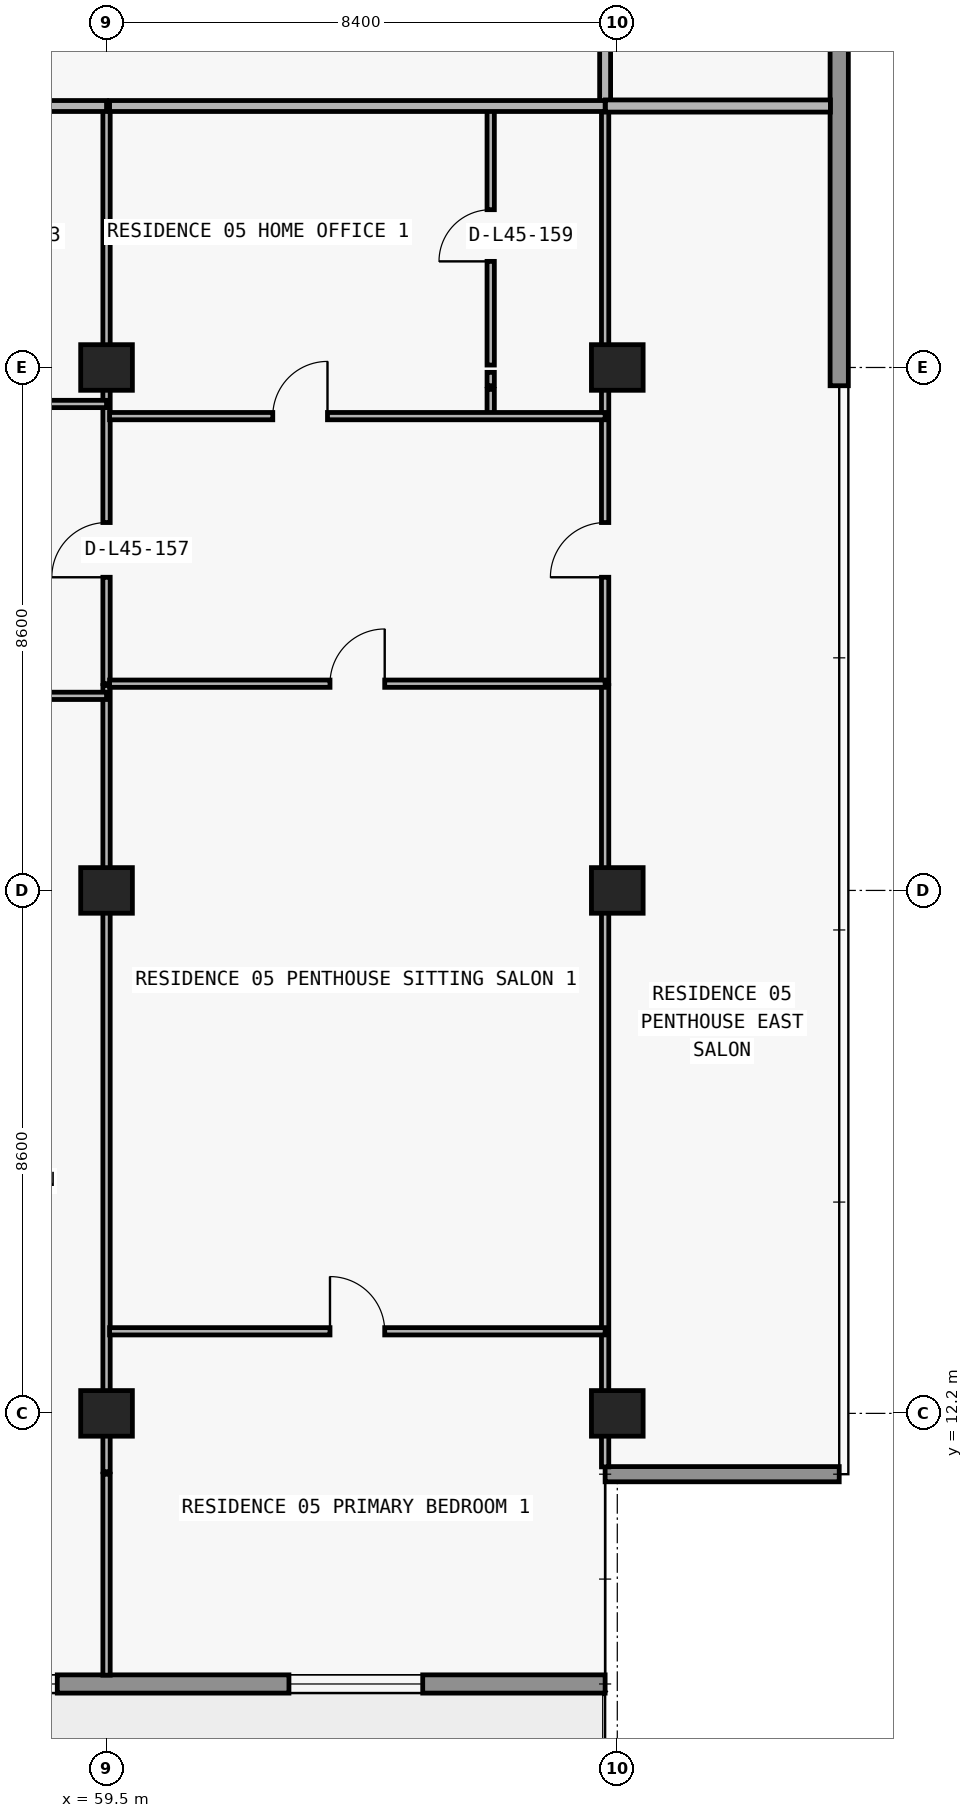
"""IFC4 building model, lengths in metres.
Left out: names, types, materials, properties, quantities, classifications, styles, units other than length and angle.
Written with IfcOpenShell. Run it as: python <this file> out.ifc"""

import sys

from ifc_helpers import new_model, si_unit, direction, frame, frame_2d, origin, origin_2d, place, context, subcontext, project, spatial, rectangle, extrude, element, fill, save


model = new_model("IFC4")
c1 = context("Model", 3, precision=1e-05, world=origin(), true_north=direction((0.0, 1.0)))
c2 = subcontext(c1, "Body", "Model", "MODEL_VIEW")
j1 = project(units=[si_unit("LENGTHUNIT", "METRE"), si_unit("PLANEANGLEUNIT", "RADIAN")], contexts=[c1])
p1 = place(None, origin())
s1 = spatial("IfcSite", under=j1, at=p1, CompositionType="ELEMENT")
p2 = place(p1, origin())
s2 = spatial("IfcBuilding", under=s1, at=p2, CompositionType="ELEMENT")
p3 = place(p2, frame((0.0, 0.0, 163.8)))
s3 = spatial("IfcBuildingStorey", under=s2, at=p3, CompositionType="ELEMENT", Elevation=163.8)
for number, where, z_axis, x_axis in (
    (1, (59.5, 12.2, 0.0), (0.0, 0.0, 1.0), (1.0, 0.0, 0.0)),
    (2, (67.9, 12.2, 0.0), (0.0, 0.0, 1.0), (1.0, 0.0, 0.0)),
    (3, (59.5, 20.8, 0.0), (0.0, 0.0, 1.0), (1.0, 0.0, 0.0)),
    (4, (67.9, 20.8, 0.0), (0.0, 0.0, 1.0), (1.0, 0.0, 0.0)),
    (5, (59.5, 29.4, 0.0), (0.0, 0.0, 1.0), (1.0, 0.0, 0.0)),
    (6, (67.9, 29.4, 0.0), (0.0, 0.0, 1.0), (1.0, 0.0, 0.0)),
):
    element("IfcColumn", number, at=place(p3, frame(where, z_axis=z_axis, x_axis=x_axis)), inside=s3, PredefinedType="COLUMN", context=c2, shape_type="SweptSolid", body=[
        extrude(rectangle(XDim=0.85, YDim=0.75, at=origin_2d()), origin(), (0.0, 0.0, 1.0), 3.05),
    ])
p4 = place(p3, frame((67.7, 7.75, 0.0), z_axis=(0.0, 0.0, 1.0), x_axis=(-1.0, 0.0, 0.0)))
e7 = element("IfcWall", 7, at=p4, inside=s3, PredefinedType="STANDARD", context=c2, shape_type="SweptSolid", body=[
    extrude(rectangle(XDim=57.6, YDim=0.3, at=frame_2d((28.8, 0.0))), origin(), (0.0, 0.0, 1.0), 3.05),
])
p5 = place(p4, frame((54.69, 0.0, 0.0)))
e8 = element("IfcOpeningElement", 8, at=p5, cuts=e7, PredefinedType="OPENING", context=c2, shape_type="SweptSolid", body=[
    extrude(rectangle(XDim=2.0, YDim=2.3, at=frame_2d((1.0, 1.15))), frame((0.0, 0.16, 0.0), z_axis=(0.0, -1.0, 0.0), x_axis=(1.0, 0.0, 0.0)), (0.0, 0.0, 1.0), 0.32),
])
p6 = place(p4, frame((50.21, 0.0, 0.65)))
e9 = element("IfcOpeningElement", 9, at=p6, cuts=e7, PredefinedType="OPENING", context=c2, shape_type="SweptSolid", body=[
    extrude(rectangle(XDim=2.6, YDim=1.85, at=frame_2d((1.3, 0.925))), frame((0.0, 0.16, 0.0), z_axis=(0.0, -1.0, 0.0), x_axis=(1.0, 0.0, 0.0)), (0.0, 0.0, 1.0), 0.32),
])
p7 = place(p4, frame((44.1, 0.0, 0.85)))
e10 = element("IfcOpeningElement", 10, at=p7, cuts=e7, PredefinedType="OPENING", context=c2, shape_type="SweptSolid", body=[
    extrude(rectangle(XDim=2.2, YDim=1.55, at=frame_2d((1.1, 0.775))), frame((0.0, 0.16, 0.0), z_axis=(0.0, -1.0, 0.0), x_axis=(1.0, 0.0, 0.0)), (0.0, 0.0, 1.0), 0.32),
])
p8 = place(p4, frame((37.69, 0.0, 0.0)))
e11 = element("IfcOpeningElement", 11, at=p8, cuts=e7, PredefinedType="OPENING", context=c2, shape_type="SweptSolid", body=[
    extrude(rectangle(XDim=2.0, YDim=2.3, at=frame_2d((1.0, 1.15))), frame((0.0, 0.16, 0.0), z_axis=(0.0, -1.0, 0.0), x_axis=(1.0, 0.0, 0.0)), (0.0, 0.0, 1.0), 0.32),
])
p9 = place(p4, frame((33.59, 0.0, 0.85)))
e12 = element("IfcOpeningElement", 12, at=p9, cuts=e7, PredefinedType="OPENING", context=c2, shape_type="SweptSolid", body=[
    extrude(rectangle(XDim=1.8, YDim=1.55, at=frame_2d((0.9, 0.775))), frame((0.0, 0.16, 0.0), z_axis=(0.0, -1.0, 0.0), x_axis=(1.0, 0.0, 0.0)), (0.0, 0.0, 1.0), 0.32),
])
p10 = place(p4, frame((25.914, 0.0, 0.85)))
e13 = element("IfcOpeningElement", 13, at=p10, cuts=e7, PredefinedType="OPENING", context=c2, shape_type="SweptSolid", body=[
    extrude(rectangle(XDim=2.2, YDim=1.55, at=frame_2d((1.1, 0.775))), frame((0.0, 0.16, 0.0), z_axis=(0.0, -1.0, 0.0), x_axis=(1.0, 0.0, 0.0)), (0.0, 0.0, 1.0), 0.32),
])
p11 = place(p4, frame((21.69, 0.0, 0.0)))
e14 = element("IfcOpeningElement", 14, at=p11, cuts=e7, PredefinedType="OPENING", context=c2, shape_type="SweptSolid", body=[
    extrude(rectangle(XDim=2.0, YDim=2.3, at=frame_2d((1.0, 1.15))), frame((0.0, 0.16, 0.0), z_axis=(0.0, -1.0, 0.0), x_axis=(1.0, 0.0, 0.0)), (0.0, 0.0, 1.0), 0.32),
])
p12 = place(p4, frame((17.59, 0.0, 0.85)))
e15 = element("IfcOpeningElement", 15, at=p12, cuts=e7, PredefinedType="OPENING", context=c2, shape_type="SweptSolid", body=[
    extrude(rectangle(XDim=1.8, YDim=1.55, at=frame_2d((0.9, 0.775))), frame((0.0, 0.16, 0.0), z_axis=(0.0, -1.0, 0.0), x_axis=(1.0, 0.0, 0.0)), (0.0, 0.0, 1.0), 0.32),
])
p13 = place(p4, frame((13.69, 0.0, 0.0)))
e16 = element("IfcOpeningElement", 16, at=p13, cuts=e7, PredefinedType="OPENING", context=c2, shape_type="SweptSolid", body=[
    extrude(rectangle(XDim=2.0, YDim=2.3, at=frame_2d((1.0, 1.15))), frame((0.0, 0.16, 0.0), z_axis=(0.0, -1.0, 0.0), x_axis=(1.0, 0.0, 0.0)), (0.0, 0.0, 1.0), 0.32),
])
p14 = place(p4, frame((9.01, 0.0, 0.65)))
e17 = element("IfcOpeningElement", 17, at=p14, cuts=e7, PredefinedType="OPENING", context=c2, shape_type="SweptSolid", body=[
    extrude(rectangle(XDim=2.6, YDim=1.85, at=frame_2d((1.3, 0.925))), frame((0.0, 0.16, 0.0), z_axis=(0.0, -1.0, 0.0), x_axis=(1.0, 0.0, 0.0)), (0.0, 0.0, 1.0), 0.32),
])
p15 = place(p4, frame((3.0, 0.0, 0.85)))
e18 = element("IfcOpeningElement", 18, at=p15, cuts=e7, PredefinedType="OPENING", context=c2, shape_type="SweptSolid", body=[
    extrude(rectangle(XDim=2.2, YDim=1.55, at=frame_2d((1.1, 0.775))), frame((0.0, 0.16, 0.0), z_axis=(0.0, -1.0, 0.0), x_axis=(1.0, 0.0, 0.0)), (0.0, 0.0, 1.0), 0.32),
])
p16 = place(p3, frame((67.7, 11.2, 0.0), z_axis=(0.0, 0.0, 1.0), x_axis=(1.0, 0.0, 0.0)))
e19 = element("IfcWall", 19, at=p16, inside=s3, PredefinedType="ELEMENTEDWALL", context=c2, shape_type="SweptSolid", body=[
    extrude(rectangle(XDim=3.85, YDim=0.25, at=frame_2d((1.925, 0.0))), origin(), (0.0, 0.0, 1.0), 3.05),
])
p17 = place(p3, frame((71.55, 47.0, 0.0), z_axis=(0.0, 0.0, 1.0), x_axis=(0.0, -1.0, 0.0)))
e20 = element("IfcWall", 20, at=p17, inside=s3, PredefinedType="STANDARD", context=c2, shape_type="SweptSolid", body=[
    extrude(rectangle(XDim=17.9, YDim=0.3, at=frame_2d((8.95, 0.0))), origin(), (0.0, 0.0, 1.0), 3.05),
])
p18 = place(p3, frame((59.5, 7.895, 0.0), z_axis=(0.0, 0.0, 1.0), x_axis=(0.0, 1.0, 0.0)))
e21 = element("IfcWall", 21, at=p18, inside=s3, PredefinedType="PARTITIONING", context=c2, shape_type="SweptSolid", body=[
    extrude(rectangle(XDim=3.305, YDim=0.12, at=frame_2d((1.652, 0.0))), origin(), (0.0, 0.0, 1.0), 3.05),
])
p19 = place(p3, frame((59.5, 11.24, 0.0), z_axis=(0.0, 0.0, 1.0), x_axis=(0.0, 1.0, 0.0)))
e22 = element("IfcWall", 22, at=p19, inside=s3, PredefinedType="PARTITIONING", context=c2, shape_type="SweptSolid", body=[
    extrude(rectangle(XDim=12.93, YDim=0.12, at=frame_2d((6.465, 0.0))), origin(), (0.0, 0.0, 1.0), 2.263),
])
p20 = place(p3, frame((59.5, 24.2, 0.0), z_axis=(0.0, 0.0, 1.0), x_axis=(0.0, 1.0, 0.0)))
e23 = element("IfcWall", 23, at=p20, inside=s3, PredefinedType="PARTITIONING", context=c2, shape_type="SweptSolid", body=[
    extrude(rectangle(XDim=4.84, YDim=0.12, at=frame_2d((2.42, 0.0))), origin(), (0.0, 0.0, 1.0), 2.263),
])
p21 = place(p20, frame((1.75, 0.0, 0.0)))
e24 = element("IfcOpeningElement", 24, at=p21, cuts=e23, PredefinedType="OPENING", context=c2, shape_type="SweptSolid", body=[
    extrude(rectangle(XDim=0.9, YDim=2.15, at=frame_2d((0.45, 1.075))), frame((0.0, 0.07, 0.0), z_axis=(0.0, -1.0, 0.0), x_axis=(1.0, 0.0, 0.0)), (0.0, 0.0, 1.0), 0.14),
])
p22 = place(p3, frame((59.5, 29.1, 0.0), z_axis=(0.0, 0.0, 1.0), x_axis=(0.0, 1.0, 0.0)))
e25 = element("IfcWall", 25, at=p22, inside=s3, PredefinedType="PARTITIONING", context=c2, shape_type="SweptSolid", body=[
    extrude(rectangle(XDim=0.22, YDim=0.12, at=frame_2d((0.11, 0.0))), origin(), (0.0, 0.0, 1.0), 3.05),
])
p23 = place(p3, frame((59.5, 29.44, 0.0), z_axis=(0.0, 0.0, 1.0), x_axis=(0.0, 1.0, 0.0)))
e26 = element("IfcWall", 26, at=p23, inside=s3, PredefinedType="PARTITIONING", context=c2, shape_type="SweptSolid", body=[
    extrude(rectangle(XDim=4.26, YDim=0.12, at=frame_2d((2.13, 0.0))), origin(), (0.0, 0.0, 1.0), 2.263),
])
p24 = place(p3, frame((65.818, 28.6, 0.0), z_axis=(0.0, 0.0, 1.0), x_axis=(0.0, 1.0, 0.0)))
e27 = element("IfcWall", 27, at=p24, inside=s3, PredefinedType="PARTITIONING", context=c2, shape_type="SweptSolid", body=[
    extrude(rectangle(XDim=0.44, YDim=0.12, at=frame_2d((0.22, 0.0))), origin(), (0.0, 0.0, 1.0), 2.725),
])
p25 = place(p3, frame((65.818, 29.1, 0.0), z_axis=(0.0, 0.0, 1.0), x_axis=(0.0, 1.0, 0.0)))
e28 = element("IfcWall", 28, at=p25, inside=s3, PredefinedType="PARTITIONING", context=c2, shape_type="SweptSolid", body=[
    extrude(rectangle(XDim=0.22, YDim=0.12, at=frame_2d((0.11, 0.0))), origin(), (0.0, 0.0, 1.0), 2.725),
])
p26 = place(p3, frame((65.818, 29.44, 0.0), z_axis=(0.0, 0.0, 1.0), x_axis=(0.0, 1.0, 0.0)))
e29 = element("IfcWall", 29, at=p26, inside=s3, PredefinedType="PARTITIONING", context=c2, shape_type="SweptSolid", body=[
    extrude(rectangle(XDim=4.26, YDim=0.12, at=frame_2d((2.13, 0.0))), origin(), (0.0, 0.0, 1.0), 2.725),
])
p27 = place(p26, frame((1.705, 0.0, 0.0)))
e30 = element("IfcOpeningElement", 30, at=p27, cuts=e29, PredefinedType="OPENING", context=c2, shape_type="SweptSolid", body=[
    extrude(rectangle(XDim=0.85, YDim=2.1, at=frame_2d((0.425, 1.05))), frame((0.0, 0.07, 0.0), z_axis=(0.0, -1.0, 0.0), x_axis=(1.0, 0.0, 0.0)), (0.0, 0.0, 1.0), 0.14),
])
p28 = place(p3, frame((67.7, 11.32, 0.0), z_axis=(0.0, 0.0, 1.0), x_axis=(0.0, 1.0, 0.0)))
e31 = element("IfcWall", 31, at=p28, inside=s3, PredefinedType="PARTITIONING", context=c2, shape_type="SweptSolid", body=[
    extrude(rectangle(XDim=12.85, YDim=0.12, at=frame_2d((6.425, 0.0))), origin(), (0.0, 0.0, 1.0), 2.263),
])
p29 = place(p3, frame((67.7, 24.2, 0.0), z_axis=(0.0, 0.0, 1.0), x_axis=(0.0, 1.0, 0.0)))
e32 = element("IfcWall", 32, at=p29, inside=s3, PredefinedType="PARTITIONING", context=c2, shape_type="SweptSolid", body=[
    extrude(rectangle(XDim=4.84, YDim=0.12, at=frame_2d((2.42, 0.0))), origin(), (0.0, 0.0, 1.0), 2.263),
])
p30 = place(p29, frame((1.75, 0.0, 0.0)))
e33 = element("IfcOpeningElement", 33, at=p30, cuts=e32, PredefinedType="OPENING", context=c2, shape_type="SweptSolid", body=[
    extrude(rectangle(XDim=0.9, YDim=2.15, at=frame_2d((0.45, 1.075))), frame((0.0, 0.07, 0.0), z_axis=(0.0, -1.0, 0.0), x_axis=(1.0, 0.0, 0.0)), (0.0, 0.0, 1.0), 0.14),
])
p31 = place(p3, frame((67.7, 29.1, 0.0), z_axis=(0.0, 0.0, 1.0), x_axis=(0.0, 1.0, 0.0)))
e34 = element("IfcWall", 34, at=p31, inside=s3, PredefinedType="PARTITIONING", context=c2, shape_type="SweptSolid", body=[
    extrude(rectangle(XDim=0.22, YDim=0.12, at=frame_2d((0.11, 0.0))), origin(), (0.0, 0.0, 1.0), 3.05),
])
p32 = place(p3, frame((67.7, 29.44, 0.0), z_axis=(0.0, 0.0, 1.0), x_axis=(0.0, 1.0, 0.0)))
e35 = element("IfcWall", 35, at=p32, inside=s3, PredefinedType="PARTITIONING", context=c2, shape_type="SweptSolid", body=[
    extrude(rectangle(XDim=4.26, YDim=0.12, at=frame_2d((2.13, 0.0))), origin(), (0.0, 0.0, 1.0), 2.263),
])
p33 = place(p3, frame((67.7, 33.705, 0.0), z_axis=(0.0, 0.0, 1.0), x_axis=(0.0, 1.0, 0.0)))
e36 = element("IfcWall", 36, at=p33, inside=s3, PredefinedType="PARTITIONING", context=c2, shape_type="SweptSolid", body=[
    extrude(rectangle(XDim=3.245, YDim=0.18, at=frame_2d((1.623, 0.0))), origin(), (0.0, 0.0, 1.0), 2.263),
])
p34 = place(p3, frame((59.55, 13.55, 0.0), z_axis=(0.0, 0.0, 1.0), x_axis=(1.0, 0.0, 0.0)))
e37 = element("IfcWall", 37, at=p34, inside=s3, PredefinedType="PARTITIONING", context=c2, shape_type="SweptSolid", body=[
    extrude(rectangle(XDim=8.15, YDim=0.12, at=frame_2d((4.075, 0.0))), origin(), (0.0, 0.0, 1.0), 3.05),
])
p35 = place(p34, frame((3.625, 0.0, 0.0)))
e38 = element("IfcOpeningElement", 38, at=p35, cuts=e37, PredefinedType="OPENING", context=c2, shape_type="SweptSolid", body=[
    extrude(rectangle(XDim=0.9, YDim=2.15, at=frame_2d((0.45, 1.075))), frame((0.0, 0.07, 0.0), z_axis=(0.0, -1.0, 0.0), x_axis=(1.0, 0.0, 0.0)), (0.0, 0.0, 1.0), 0.14),
])
p36 = place(p3, frame((51.32, 24.0, 0.0), z_axis=(0.0, 0.0, 1.0), x_axis=(1.0, 0.0, 0.0)))
e39 = element("IfcWall", 39, at=p36, inside=s3, PredefinedType="PARTITIONING", context=c2, shape_type="SweptSolid", body=[
    extrude(rectangle(XDim=8.18, YDim=0.12, at=frame_2d((4.09, 0.0))), origin(), (0.0, 0.0, 1.0), 3.05),
])
p37 = place(p36, frame((1.33, 0.0, 0.0)))
e40 = element("IfcOpeningElement", 40, at=p37, cuts=e39, PredefinedType="OPENING", context=c2, shape_type="SweptSolid", body=[
    extrude(rectangle(XDim=0.9, YDim=2.15, at=frame_2d((0.45, 1.075))), frame((0.0, 0.07, 0.0), z_axis=(0.0, -1.0, 0.0), x_axis=(1.0, 0.0, 0.0)), (0.0, 0.0, 1.0), 0.14),
])
p38 = place(p3, frame((59.55, 24.2, 0.0), z_axis=(0.0, 0.0, 1.0), x_axis=(1.0, 0.0, 0.0)))
e41 = element("IfcWall", 41, at=p38, inside=s3, PredefinedType="PARTITIONING", context=c2, shape_type="SweptSolid", body=[
    extrude(rectangle(XDim=8.15, YDim=0.12, at=frame_2d((4.075, 0.0))), origin(), (0.0, 0.0, 1.0), 3.05),
])
p39 = place(p38, frame((3.625, 0.0, 0.0)))
e42 = element("IfcOpeningElement", 42, at=p39, cuts=e41, PredefinedType="OPENING", context=c2, shape_type="SweptSolid", body=[
    extrude(rectangle(XDim=0.9, YDim=2.15, at=frame_2d((0.45, 1.075))), frame((0.0, 0.07, 0.0), z_axis=(0.0, -1.0, 0.0), x_axis=(1.0, 0.0, 0.0)), (0.0, 0.0, 1.0), 0.14),
])
p40 = place(p3, frame((59.55, 28.6, 0.0), z_axis=(0.0, 0.0, 1.0), x_axis=(1.0, 0.0, 0.0)))
e43 = element("IfcWall", 43, at=p40, inside=s3, PredefinedType="PARTITIONING", context=c2, shape_type="SweptSolid", body=[
    extrude(rectangle(XDim=8.15, YDim=0.12, at=frame_2d((4.075, 0.0))), origin(), (0.0, 0.0, 1.0), 3.05),
])
p41 = place(p40, frame((2.684, 0.0, 0.0)))
e44 = element("IfcOpeningElement", 44, at=p41, cuts=e43, PredefinedType="OPENING", context=c2, shape_type="SweptSolid", body=[
    extrude(rectangle(XDim=0.9, YDim=2.15, at=frame_2d((0.45, 1.075))), frame((0.0, 0.07, 0.0), z_axis=(0.0, -1.0, 0.0), x_axis=(1.0, 0.0, 0.0)), (0.0, 0.0, 1.0), 0.14),
])
p42 = place(p3, frame((51.32, 28.8, 0.0), z_axis=(0.0, 0.0, 1.0), x_axis=(1.0, 0.0, 0.0)))
e45 = element("IfcWall", 45, at=p42, inside=s3, PredefinedType="PARTITIONING", context=c2, shape_type="SweptSolid", body=[
    extrude(rectangle(XDim=8.18, YDim=0.12, at=frame_2d((4.09, 0.0))), origin(), (0.0, 0.0, 1.0), 3.05),
])
p43 = place(p42, frame((1.33, 0.0, 0.0)))
e46 = element("IfcOpeningElement", 46, at=p43, cuts=e45, PredefinedType="OPENING", context=c2, shape_type="SweptSolid", body=[
    extrude(rectangle(XDim=0.9, YDim=2.15, at=frame_2d((0.45, 1.075))), frame((0.0, 0.07, 0.0), z_axis=(0.0, -1.0, 0.0), x_axis=(1.0, 0.0, 0.0)), (0.0, 0.0, 1.0), 0.14),
])
p44 = place(p3, frame((38.75, 33.7, 0.0), z_axis=(0.0, 0.0, 1.0), x_axis=(1.0, 0.0, 0.0)))
e47 = element("IfcWall", 47, at=p44, inside=s3, PredefinedType="PARTITIONING", context=c2, shape_type="SweptSolid", body=[
    extrude(rectangle(XDim=20.75, YDim=0.18, at=frame_2d((10.375, 0.0))), origin(), (0.0, 0.0, 1.0), 3.05),
])
p45 = place(p44, frame((6.474, 0.0, 0.0)))
e48 = element("IfcOpeningElement", 48, at=p45, cuts=e47, PredefinedType="OPENING", context=c2, shape_type="SweptSolid", body=[
    extrude(rectangle(XDim=1.0, YDim=2.2, at=frame_2d((0.5, 1.1))), frame((0.0, 0.1, 0.0), z_axis=(0.0, -1.0, 0.0), x_axis=(1.0, 0.0, 0.0)), (0.0, 0.0, 1.0), 0.2),
])
p46 = place(p44, frame((14.999, 0.0, 0.0)))
e49 = element("IfcOpeningElement", 49, at=p46, cuts=e47, PredefinedType="OPENING", context=c2, shape_type="SweptSolid", body=[
    extrude(rectangle(XDim=1.0, YDim=2.2, at=frame_2d((0.5, 1.1))), frame((0.0, 0.1, 0.0), z_axis=(0.0, -1.0, 0.0), x_axis=(1.0, 0.0, 0.0)), (0.0, 0.0, 1.0), 0.2),
])
p47 = place(p3, frame((59.55, 33.7, 0.0), z_axis=(0.0, 0.0, 1.0), x_axis=(1.0, 0.0, 0.0)))
e50 = element("IfcWall", 50, at=p47, inside=s3, PredefinedType="PARTITIONING", context=c2, shape_type="SweptSolid", body=[
    extrude(rectangle(XDim=8.15, YDim=0.18, at=frame_2d((4.075, 0.0))), origin(), (0.0, 0.0, 1.0), 3.05),
])
p48 = place(p3, frame((67.705, 33.7, 0.0), z_axis=(0.0, 0.0, 1.0), x_axis=(1.0, 0.0, 0.0)))
e51 = element("IfcWall", 51, at=p48, inside=s3, PredefinedType="PARTITIONING", context=c2, shape_type="SweptSolid", body=[
    extrude(rectangle(XDim=3.7, YDim=0.2, at=frame_2d((1.85, 0.0))), origin(), (0.0, 0.0, 1.0), 3.05),
])
p49 = place(p14, origin())
e52 = element("IfcWindow", 52, at=p49, inside=s3, PartitioningType="SINGLE_PANEL", PredefinedType="WINDOW", context=c2, shape_type="SweptSolid", body=[
    extrude(rectangle(XDim=2.6, YDim=1.85, at=frame_2d((1.3, 0.925))), frame((0.0, 0.03, 0.0), z_axis=(0.0, -1.0, 0.0), x_axis=(1.0, 0.0, 0.0)), (0.0, 0.0, 1.0), 0.06),
])
fill(e17, e52)
p50 = place(p15, origin())
e53 = element("IfcWindow", 53, at=p50, inside=s3, PartitioningType="SINGLE_PANEL", PredefinedType="WINDOW", context=c2, shape_type="SweptSolid", body=[
    extrude(rectangle(XDim=2.2, YDim=1.55, at=frame_2d((1.1, 0.775))), frame((0.0, 0.03, 0.0), z_axis=(0.0, -1.0, 0.0), x_axis=(1.0, 0.0, 0.0)), (0.0, 0.0, 1.0), 0.06),
])
fill(e18, e53)
p51 = place(p21, origin())
e54 = element("IfcDoor", 54, at=p51, inside=s3, OperationType="SINGLE_SWING_LEFT", PredefinedType="DOOR", context=c2, shape_type="SweptSolid", body=[
    extrude(rectangle(XDim=0.9, YDim=2.15, at=frame_2d((0.45, 1.075))), frame((0.0, 0.025, 0.0), z_axis=(0.0, -1.0, 0.0), x_axis=(1.0, 0.0, 0.0)), (0.0, 0.0, 1.0), 0.05),
])
fill(e24, e54)
p52 = place(p41, origin())
e55 = element("IfcDoor", 55, at=p52, inside=s3, OperationType="SINGLE_SWING_RIGHT", PredefinedType="DOOR", context=c2, shape_type="SweptSolid", body=[
    extrude(rectangle(XDim=0.9, YDim=2.15, at=frame_2d((0.45, 1.075))), frame((0.0, 0.025, 0.0), z_axis=(0.0, -1.0, 0.0), x_axis=(1.0, 0.0, 0.0)), (0.0, 0.0, 1.0), 0.05),
])
fill(e44, e55)
p53 = place(p27, origin())
e56 = element("IfcDoor", 56, at=p53, inside=s3, OperationType="SINGLE_SWING_LEFT", PredefinedType="DOOR", context=c2, shape_type="SweptSolid", body=[
    extrude(rectangle(XDim=0.85, YDim=2.1, at=frame_2d((0.425, 1.05))), frame((0.0, 0.025, 0.0), z_axis=(0.0, -1.0, 0.0), x_axis=(1.0, 0.0, 0.0)), (0.0, 0.0, 1.0), 0.05),
])
fill(e30, e56)
p54 = place(p39, origin())
e57 = element("IfcDoor", 57, at=p54, inside=s3, OperationType="SINGLE_SWING_RIGHT", PredefinedType="DOOR", context=c2, shape_type="SweptSolid", body=[
    extrude(rectangle(XDim=0.9, YDim=2.15, at=frame_2d((0.45, 1.075))), frame((0.0, 0.025, 0.0), z_axis=(0.0, -1.0, 0.0), x_axis=(1.0, 0.0, 0.0)), (0.0, 0.0, 1.0), 0.05),
])
fill(e42, e57)
p55 = place(p35, origin())
e58 = element("IfcDoor", 58, at=p55, inside=s3, OperationType="SINGLE_SWING_LEFT", PredefinedType="DOOR", context=c2, shape_type="SweptSolid", body=[
    extrude(rectangle(XDim=0.9, YDim=2.15, at=frame_2d((0.45, 1.075))), frame((0.0, 0.025, 0.0), z_axis=(0.0, -1.0, 0.0), x_axis=(1.0, 0.0, 0.0)), (0.0, 0.0, 1.0), 0.05),
])
fill(e38, e58)
p56 = place(p30, origin())
e59 = element("IfcDoor", 59, at=p56, inside=s3, OperationType="SINGLE_SWING_LEFT", PredefinedType="DOOR", context=c2, shape_type="SweptSolid", body=[
    extrude(rectangle(XDim=0.9, YDim=2.15, at=frame_2d((0.45, 1.075))), frame((0.0, 0.025, 0.0), z_axis=(0.0, -1.0, 0.0), x_axis=(1.0, 0.0, 0.0)), (0.0, 0.0, 1.0), 0.05),
])
fill(e33, e59)
save(model, sys.argv[1])
